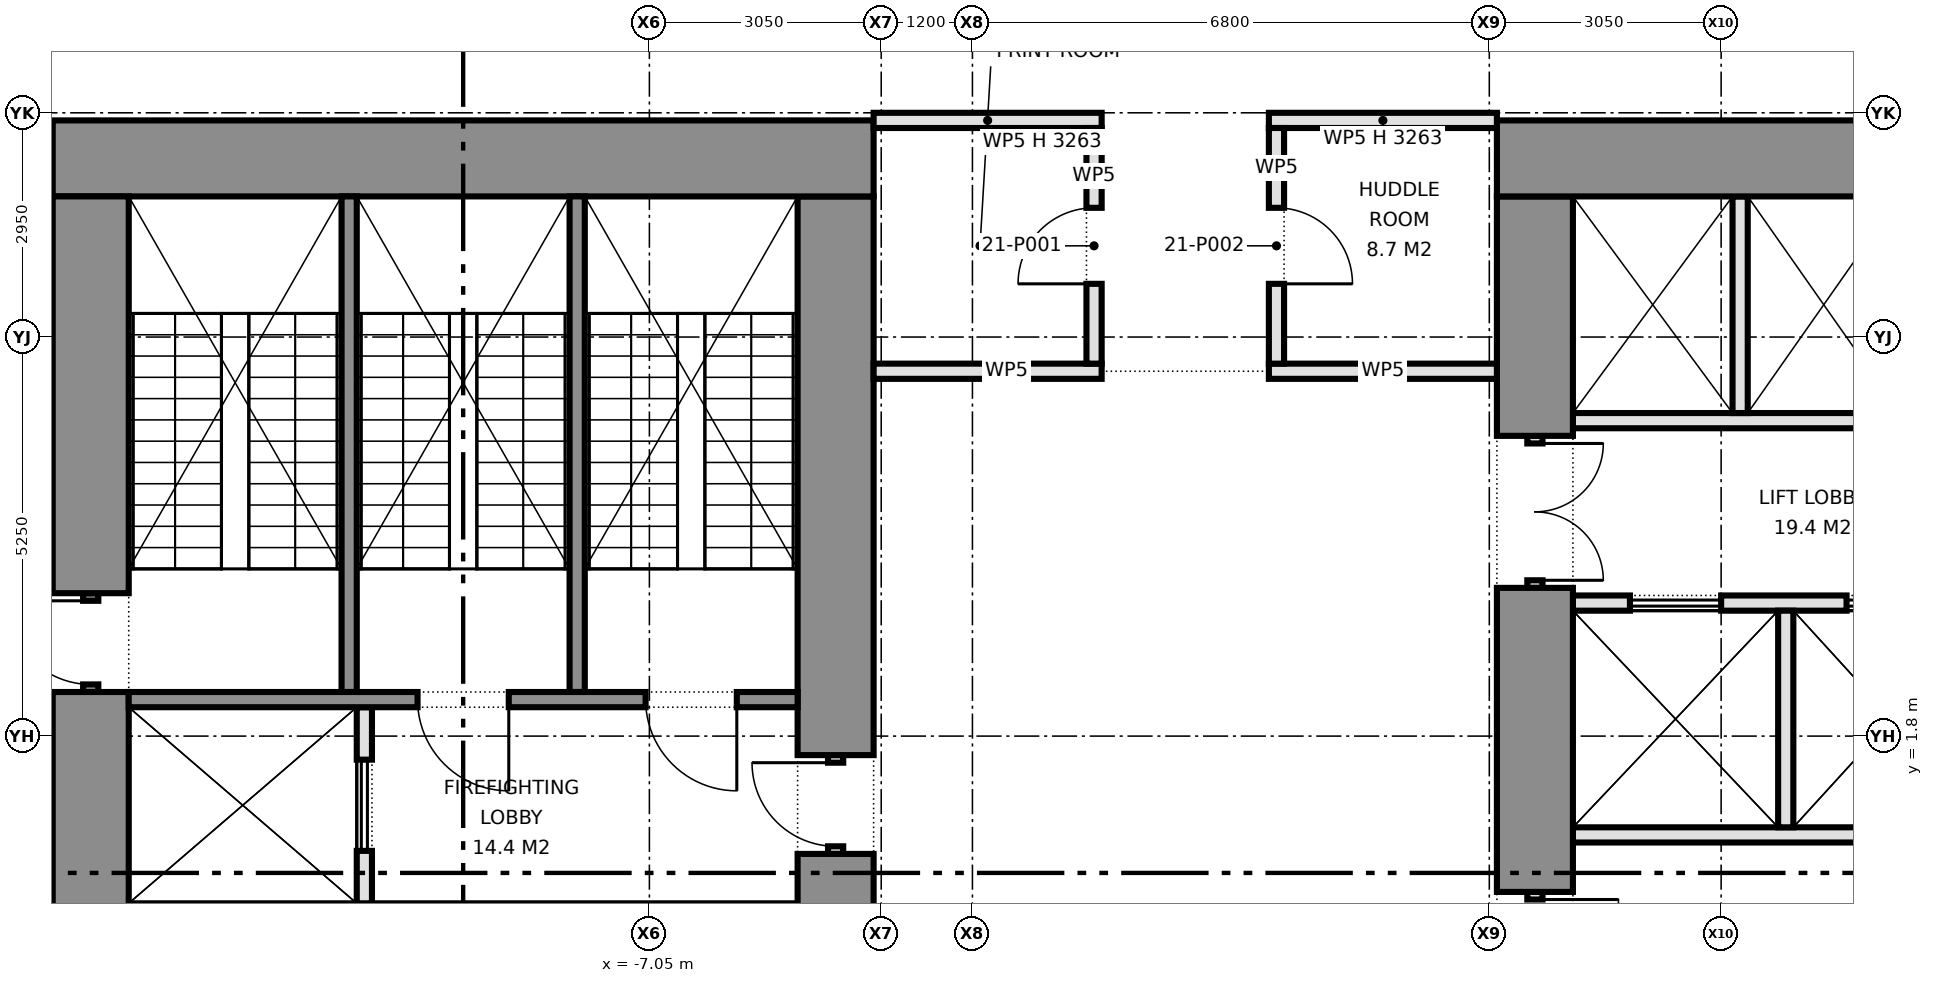
"""IFC4 building model, lengths in metres.
Left out: names, types, materials, properties, quantities, classifications, styles, units other than length and angle.
Written with IfcOpenShell. Run it as: python <this file> out.ifc"""

import sys

from ifc_helpers import new_model, si_unit, direction, frame, frame_2d, origin, place, context, subcontext, project, spatial, rectangle, extrude, element, fill, save


model = new_model("IFC4")
c1 = context("Model", 3, precision=1e-05, world=origin(), true_north=direction((0.0, 1.0)))
c2 = subcontext(c1, "Body", "Model", "MODEL_VIEW")
j1 = project(units=[si_unit("LENGTHUNIT", "METRE"), si_unit("PLANEANGLEUNIT", "RADIAN")], contexts=[c1])
p1 = place(None, origin())
s1 = spatial("IfcSite", under=j1, at=p1, CompositionType="ELEMENT")
p2 = place(p1, origin())
s2 = spatial("IfcBuilding", under=s1, at=p2, CompositionType="ELEMENT")
p3 = place(p2, frame((0.0, 0.0, 95.2)))
s3 = spatial("IfcBuildingStorey", under=s2, at=p3, CompositionType="ELEMENT", Elevation=95.2)
p4 = place(p3, frame((-14.9, 9.4, 0.0), z_axis=(0.0, 0.0, 1.0), x_axis=(1.0, 0.0, 0.0)))
e1 = element("IfcWall", 1, at=p4, inside=s3, PredefinedType="SHEAR", context=c2, shape_type="SweptSolid", body=[
    extrude(rectangle(XDim=10.8, YDim=1.0, at=frame_2d((5.4, 0.0))), origin(), (0.0, 0.0, 1.0), 4.2),
])
p5 = place(p3, frame((-14.4, -3.75, 0.0), z_axis=(0.0, 0.0, 1.0), x_axis=(0.0, 1.0, 0.0)))
e2 = element("IfcWall", 2, at=p5, inside=s3, PredefinedType="SHEAR", context=c2, shape_type="SweptSolid", body=[
    extrude(rectangle(XDim=6.13, YDim=1.0, at=frame_2d((3.065, 0.0))), origin(), (0.0, 0.0, 1.0), 4.2),
])
p6 = place(p3, frame((-14.4, 2.38, 0.0), z_axis=(0.0, 0.0, 1.0), x_axis=(0.0, 1.0, 0.0)))
e3 = element("IfcWall", 3, at=p6, inside=s3, PredefinedType="SHEAR", context=c2, shape_type="SweptSolid", body=[
    extrude(rectangle(XDim=1.3, YDim=0.2, at=frame_2d((0.65, 0.0))), origin(), (0.0, 0.0, 1.0), 2.4),
])
p7 = place(p6, frame((0.1, 0.0, 0.0)))
e4 = element("IfcOpeningElement", 4, at=p7, cuts=e3, PredefinedType="OPENING", context=c2, shape_type="SweptSolid", body=[
    extrude(rectangle(XDim=1.1, YDim=2.1, at=frame_2d((0.55, 1.05))), frame((0.0, 0.11, 0.0), z_axis=(0.0, -1.0, 0.0), x_axis=(1.0, 0.0, 0.0)), (0.0, 0.0, 1.0), 0.22),
])
p8 = place(p3, frame((-14.4, 3.68, 0.0), z_axis=(0.0, 0.0, 1.0), x_axis=(0.0, 1.0, 0.0)))
e5 = element("IfcWall", 5, at=p8, inside=s3, PredefinedType="SHEAR", context=c2, shape_type="SweptSolid", body=[
    extrude(rectangle(XDim=5.22, YDim=1.0, at=frame_2d((2.61, 0.0))), origin(), (0.0, 0.0, 1.0), 4.2),
])
p9 = place(p3, frame((-4.6, -3.75, 0.0), z_axis=(0.0, 0.0, 1.0), x_axis=(0.0, 1.0, 0.0)))
e6 = element("IfcWall", 6, at=p9, inside=s3, PredefinedType="SHEAR", context=c2, shape_type="SweptSolid", body=[
    extrude(rectangle(XDim=4.0, YDim=1.0, at=frame_2d((2.0, 0.0))), origin(), (0.0, 0.0, 1.0), 4.2),
])
p10 = place(p3, frame((-4.6, 0.25, 0.0), z_axis=(0.0, 0.0, 1.0), x_axis=(0.0, 1.0, 0.0)))
e7 = element("IfcWall", 7, at=p10, inside=s3, PredefinedType="PARTITIONING", context=c2, shape_type="SweptSolid", body=[
    extrude(rectangle(XDim=1.3, YDim=0.2, at=frame_2d((0.65, 0.0))), origin(), (0.0, 0.0, 1.0), 2.4),
])
p11 = place(p10, frame((0.1, 0.0, 0.0)))
e8 = element("IfcOpeningElement", 8, at=p11, cuts=e7, PredefinedType="OPENING", context=c2, shape_type="SweptSolid", body=[
    extrude(rectangle(XDim=1.1, YDim=2.1, at=frame_2d((0.55, 1.05))), frame((0.0, 0.11, 0.0), z_axis=(0.0, -1.0, 0.0), x_axis=(1.0, 0.0, 0.0)), (0.0, 0.0, 1.0), 0.22),
])
p12 = place(p3, frame((-4.6, 1.55, 0.0), z_axis=(0.0, 0.0, 1.0), x_axis=(0.0, 1.0, 0.0)))
e9 = element("IfcWall", 9, at=p12, inside=s3, PredefinedType="SHEAR", context=c2, shape_type="SweptSolid", body=[
    extrude(rectangle(XDim=7.35, YDim=1.0, at=frame_2d((3.675, 0.0))), origin(), (0.0, 0.0, 1.0), 4.2),
])
p13 = place(p3, frame((-10.8, -0.4, 0.0), z_axis=(0.0, 0.0, 1.0), x_axis=(0.0, 1.0, 0.0)))
e10 = element("IfcWall", 10, at=p13, inside=s3, PredefinedType="PARTITIONING", context=c2, shape_type="SweptSolid", body=[
    extrude(rectangle(XDim=2.58, YDim=0.2, at=frame_2d((1.29, 0.0))), origin(), (0.0, 0.0, 1.0), 4.2),
])
p14 = place(p13, frame((0.69, 0.0, 0.0)))
e11 = element("IfcOpeningElement", 11, at=p14, cuts=e10, PredefinedType="OPENING", context=c2, shape_type="SweptSolid", body=[
    extrude(rectangle(XDim=1.2, YDim=2.1, at=frame_2d((0.6, 1.05))), frame((0.0, 0.11, 0.0), z_axis=(0.0, -1.0, 0.0), x_axis=(1.0, 0.0, 0.0)), (0.0, 0.0, 1.0), 0.22),
])
p15 = place(p3, frame((-13.9, 2.28, 0.0), z_axis=(0.0, 0.0, 1.0), x_axis=(1.0, 0.0, 0.0)))
e12 = element("IfcWall", 12, at=p15, inside=s3, PredefinedType="SHEAR", context=c2, shape_type="SweptSolid", body=[
    extrude(rectangle(XDim=8.8, YDim=0.2, at=frame_2d((4.4, 0.0))), origin(), (0.0, 0.0, 1.0), 4.2),
])
p16 = place(p15, frame((3.8, 0.0, 0.0)))
e13 = element("IfcOpeningElement", 13, at=p16, cuts=e12, PredefinedType="OPENING", context=c2, shape_type="SweptSolid", body=[
    extrude(rectangle(XDim=1.2, YDim=2.1, at=frame_2d((0.6, 1.05))), frame((0.0, 0.11, 0.0), z_axis=(0.0, -1.0, 0.0), x_axis=(1.0, 0.0, 0.0)), (0.0, 0.0, 1.0), 0.22),
])
p17 = place(p15, frame((6.8, 0.0, 0.0)))
e14 = element("IfcOpeningElement", 14, at=p17, cuts=e12, PredefinedType="OPENING", context=c2, shape_type="SweptSolid", body=[
    extrude(rectangle(XDim=1.2, YDim=2.1, at=frame_2d((0.6, 1.05))), frame((0.0, 0.11, 0.0), z_axis=(0.0, -1.0, 0.0), x_axis=(1.0, 0.0, 0.0)), (0.0, 0.0, 1.0), 0.22),
])
for number, where, z_axis, x_axis in (
    (15, (-11.0, 2.38, 0.0), (0.0, 0.0, 1.0), (0.0, 1.0, 0.0)),
    (16, (-8.0, 2.38, 0.0), (0.0, 0.0, 1.0), (0.0, 1.0, 0.0)),
):
    element("IfcWall", number, at=place(p3, frame(where, z_axis=z_axis, x_axis=x_axis)), inside=s3, PredefinedType="SHEAR", context=c2, shape_type="SweptSolid", body=[
        extrude(rectangle(XDim=6.52, YDim=0.2, at=frame_2d((3.26, 0.0))), origin(), (0.0, 0.0, 1.0), 4.2),
    ])
p18 = place(p3, frame((14.9, 9.4, 0.0), z_axis=(0.0, 0.0, 1.0), x_axis=(-1.0, 0.0, 0.0)))
e17 = element("IfcWall", 17, at=p18, inside=s3, PredefinedType="SHEAR", context=c2, shape_type="SweptSolid", body=[
    extrude(rectangle(XDim=10.8, YDim=1.0, at=frame_2d((5.4, 0.0))), origin(), (0.0, 0.0, 1.0), 4.2),
])
p19 = place(p3, frame((4.6, 8.9, 0.0), z_axis=(0.0, 0.0, 1.0), x_axis=(0.0, -1.0, 0.0)))
e18 = element("IfcWall", 18, at=p19, inside=s3, PredefinedType="SHEAR", context=c2, shape_type="SweptSolid", body=[
    extrude(rectangle(XDim=3.15, YDim=1.0, at=frame_2d((1.575, 0.0))), origin(), (0.0, 0.0, 1.0), 4.2),
])
p20 = place(p3, frame((4.6, 5.75, 0.0), z_axis=(0.0, 0.0, 1.0), x_axis=(0.0, -1.0, 0.0)))
e19 = element("IfcWall", 19, at=p20, inside=s3, PredefinedType="PARTITIONING", context=c2, shape_type="SweptSolid", body=[
    extrude(rectangle(XDim=2.0, YDim=0.2, at=frame_2d((1.0, 0.0))), origin(), (0.0, 0.0, 1.0), 2.4),
])
p21 = place(p20, frame((0.1, 0.0, 0.0)))
e20 = element("IfcOpeningElement", 20, at=p21, cuts=e19, PredefinedType="OPENING", context=c2, shape_type="SweptSolid", body=[
    extrude(rectangle(XDim=1.8, YDim=2.1, at=frame_2d((0.9, 1.05))), frame((0.0, 0.11, 0.0), z_axis=(0.0, -1.0, 0.0), x_axis=(1.0, 0.0, 0.0)), (0.0, 0.0, 1.0), 0.22),
])
p22 = place(p3, frame((4.6, 3.75, 0.0), z_axis=(0.0, 0.0, 1.0), x_axis=(0.0, -1.0, 0.0)))
e21 = element("IfcWall", 21, at=p22, inside=s3, PredefinedType="SHEAR", context=c2, shape_type="SweptSolid", body=[
    extrude(rectangle(XDim=4.0, YDim=1.0, at=frame_2d((2.0, 0.0))), origin(), (0.0, 0.0, 1.0), 4.2),
])
p23 = place(p3, frame((4.6, -0.25, 0.0), z_axis=(0.0, 0.0, 1.0), x_axis=(0.0, -1.0, 0.0)))
e22 = element("IfcWall", 22, at=p23, inside=s3, PredefinedType="PARTITIONING", context=c2, shape_type="SweptSolid", body=[
    extrude(rectangle(XDim=1.3, YDim=0.2, at=frame_2d((0.65, 0.0))), origin(), (0.0, 0.0, 1.0), 2.4),
])
p24 = place(p23, frame((0.1, 0.0, 0.0)))
e23 = element("IfcOpeningElement", 23, at=p24, cuts=e22, PredefinedType="OPENING", context=c2, shape_type="SweptSolid", body=[
    extrude(rectangle(XDim=1.1, YDim=2.1, at=frame_2d((0.55, 1.05))), frame((0.0, 0.11, 0.0), z_axis=(0.0, -1.0, 0.0), x_axis=(1.0, 0.0, 0.0)), (0.0, 0.0, 1.0), 0.22),
])
p25 = place(p3, frame((13.9, 5.95, 0.0), z_axis=(0.0, 0.0, 1.0), x_axis=(-1.0, 0.0, 0.0)))
e24 = element("IfcWall", 24, at=p25, inside=s3, PredefinedType="PARTITIONING", context=c2, shape_type="SweptSolid", body=[
    extrude(rectangle(XDim=8.8, YDim=0.2, at=frame_2d((4.4, 0.0))), origin(), (0.0, 0.0, 1.0), 4.2),
])
p26 = place(p25, frame((1.7, 0.0, 0.0)))
e25 = element("IfcOpeningElement", 25, at=p26, cuts=e24, PredefinedType="OPENING", context=c2, shape_type="SweptSolid", body=[
    extrude(rectangle(XDim=0.9, YDim=2.1, at=frame_2d((0.45, 1.05))), frame((0.0, 0.11, 0.0), z_axis=(0.0, -1.0, 0.0), x_axis=(1.0, 0.0, 0.0)), (0.0, 0.0, 1.0), 0.22),
])
p27 = place(p3, frame((13.9, 3.55, 0.0), z_axis=(0.0, 0.0, 1.0), x_axis=(-1.0, 0.0, 0.0)))
e26 = element("IfcWall", 26, at=p27, inside=s3, PredefinedType="PARTITIONING", context=c2, shape_type="SweptSolid", body=[
    extrude(rectangle(XDim=8.8, YDim=0.2, at=frame_2d((4.4, 0.0))), origin(), (0.0, 0.0, 1.0), 4.2),
])
p28 = place(p27, frame((0.65, 0.0, 0.0)))
e27 = element("IfcOpeningElement", 27, at=p28, cuts=e26, PredefinedType="OPENING", context=c2, shape_type="SweptSolid", body=[
    extrude(rectangle(XDim=1.8, YDim=2.1, at=frame_2d((0.9, 1.05))), frame((0.0, 0.11, 0.0), z_axis=(0.0, -1.0, 0.0), x_axis=(1.0, 0.0, 0.0)), (0.0, 0.0, 1.0), 0.22),
])
p29 = place(p27, frame((4.0, 0.0, 0.0)))
e28 = element("IfcOpeningElement", 28, at=p29, cuts=e26, PredefinedType="OPENING", context=c2, shape_type="SweptSolid", body=[
    extrude(rectangle(XDim=1.2, YDim=2.1, at=frame_2d((0.6, 1.05))), frame((0.0, 0.11, 0.0), z_axis=(0.0, -1.0, 0.0), x_axis=(1.0, 0.0, 0.0)), (0.0, 0.0, 1.0), 0.22),
])
p30 = place(p27, frame((6.85, 0.0, 0.0)))
e29 = element("IfcOpeningElement", 29, at=p30, cuts=e26, PredefinedType="OPENING", context=c2, shape_type="SweptSolid", body=[
    extrude(rectangle(XDim=1.2, YDim=2.1, at=frame_2d((0.6, 1.05))), frame((0.0, 0.11, 0.0), z_axis=(0.0, -1.0, 0.0), x_axis=(1.0, 0.0, 0.0)), (0.0, 0.0, 1.0), 0.22),
])
p31 = place(p3, frame((13.9, 0.5, 0.0), z_axis=(0.0, 0.0, 1.0), x_axis=(-1.0, 0.0, 0.0)))
e30 = element("IfcWall", 30, at=p31, inside=s3, PredefinedType="PARTITIONING", context=c2, shape_type="SweptSolid", body=[
    extrude(rectangle(XDim=8.8, YDim=0.2, at=frame_2d((4.4, 0.0))), origin(), (0.0, 0.0, 1.0), 4.2),
])
for number, where, z_axis, x_axis in (
    (31, (7.3, 8.9, 0.0), (0.0, 0.0, 1.0), (0.0, -1.0, 0.0)),
    (32, (7.9, 3.45, 0.0), (0.0, 0.0, 1.0), (0.0, -1.0, 0.0)),
):
    element("IfcWall", number, at=place(p3, frame(where, z_axis=z_axis, x_axis=x_axis)), inside=s3, PredefinedType="PARTITIONING", context=c2, shape_type="SweptSolid", body=[
        extrude(rectangle(XDim=2.85, YDim=0.2, at=frame_2d((1.425, 0.0))), origin(), (0.0, 0.0, 1.0), 4.2),
    ])
for number, where, z_axis, x_axis in (
    (33, (-4.1, 6.6, 0.0), (0.0, 0.0, 1.0), (1.0, 0.0, 0.0)),
    (34, (1.1, 6.6, 0.0), (0.0, 0.0, 1.0), (1.0, 0.0, 0.0)),
):
    element("IfcWall", number, at=place(p3, frame(where, z_axis=z_axis, x_axis=x_axis)), inside=s3, PredefinedType="PARTITIONING", context=c2, shape_type="SweptSolid", body=[
        extrude(rectangle(XDim=3.0, YDim=0.2, at=frame_2d((1.5, 0.0))), origin(), (0.0, 0.0, 1.0), 4.2),
    ])
for number, where, z_axis, x_axis in (
    (35, (-4.1, 9.9, 0.0), (0.0, 0.0, 1.0), (1.0, 0.0, 0.0)),
    (36, (1.1, 9.9, 0.0), (0.0, 0.0, 1.0), (1.0, 0.0, 0.0)),
):
    element("IfcWall", number, at=place(p3, frame(where, z_axis=z_axis, x_axis=x_axis)), inside=s3, PredefinedType="PARTITIONING", context=c2, shape_type="SweptSolid", body=[
        extrude(rectangle(XDim=3.0, YDim=0.2, at=frame_2d((1.5, 0.0))), origin(), (0.0, 0.0, 1.0), 3.263),
    ])
p32 = place(p3, frame((1.2, 6.7, 0.0), z_axis=(0.0, 0.0, 1.0), x_axis=(0.0, 1.0, 0.0)))
e37 = element("IfcWall", 37, at=p32, inside=s3, PredefinedType="PARTITIONING", context=c2, shape_type="SweptSolid", body=[
    extrude(rectangle(XDim=3.1, YDim=0.2, at=frame_2d((1.55, 0.0))), origin(), (0.0, 0.0, 1.0), 4.2),
])
p33 = place(p32, frame((1.05, 0.0, 0.0)))
e38 = element("IfcOpeningElement", 38, at=p33, cuts=e37, PredefinedType="OPENING", context=c2, shape_type="SweptSolid", body=[
    extrude(rectangle(XDim=1.0, YDim=2.1, at=frame_2d((0.5, 1.05))), frame((0.0, 0.11, 0.0), z_axis=(0.0, -1.0, 0.0), x_axis=(1.0, 0.0, 0.0)), (0.0, 0.0, 1.0), 0.22),
])
p34 = place(p3, frame((-1.2, 6.7, 0.0), z_axis=(0.0, 0.0, 1.0), x_axis=(0.0, 1.0, 0.0)))
e39 = element("IfcWall", 39, at=p34, inside=s3, PredefinedType="PARTITIONING", context=c2, shape_type="SweptSolid", body=[
    extrude(rectangle(XDim=3.1, YDim=0.2, at=frame_2d((1.55, 0.0))), origin(), (0.0, 0.0, 1.0), 4.2),
])
p35 = place(p34, frame((1.05, 0.0, 0.0)))
e40 = element("IfcOpeningElement", 40, at=p35, cuts=e39, PredefinedType="OPENING", context=c2, shape_type="SweptSolid", body=[
    extrude(rectangle(XDim=1.0, YDim=2.1, at=frame_2d((0.5, 1.05))), frame((0.0, 0.11, 0.0), z_axis=(0.0, -1.0, 0.0), x_axis=(1.0, 0.0, 0.0)), (0.0, 0.0, 1.0), 0.22),
])
p36 = place(p7, origin())
e41 = element("IfcDoor", 41, at=p36, inside=s3, OperationType="SINGLE_SWING_RIGHT", PredefinedType="DOOR", context=c2, shape_type="SweptSolid", body=[
    extrude(rectangle(XDim=1.1, YDim=2.1, at=frame_2d((0.55, 1.05))), frame((0.0, 0.025, 0.0), z_axis=(0.0, -1.0, 0.0), x_axis=(1.0, 0.0, 0.0)), (0.0, 0.0, 1.0), 0.05),
])
fill(e4, e41)
p37 = place(p11, origin())
e42 = element("IfcDoor", 42, at=p37, inside=s3, OperationType="SINGLE_SWING_RIGHT", PredefinedType="DOOR", context=c2, shape_type="SweptSolid", body=[
    extrude(rectangle(XDim=1.1, YDim=2.1, at=frame_2d((0.55, 1.05))), frame((0.0, 0.025, 0.0), z_axis=(0.0, -1.0, 0.0), x_axis=(1.0, 0.0, 0.0)), (0.0, 0.0, 1.0), 0.05),
])
fill(e8, e42)
p38 = place(p14, origin())
e43 = element("IfcDoor", 43, at=p38, inside=s3, OperationType="DOUBLE_DOOR_SLIDING", PredefinedType="DOOR", context=c2, shape_type="SweptSolid", body=[
    extrude(rectangle(XDim=1.2, YDim=2.1, at=frame_2d((0.6, 1.05))), frame((0.0, 0.025, 0.0), z_axis=(0.0, -1.0, 0.0), x_axis=(1.0, 0.0, 0.0)), (0.0, 0.0, 1.0), 0.05),
])
fill(e11, e43)
p39 = place(p16, frame((1.2, 0.0, 0.0), z_axis=(0.0, 0.0, 1.0), x_axis=(-1.0, 0.0, 0.0)))
e44 = element("IfcDoor", 44, at=p39, inside=s3, OperationType="SINGLE_SWING_LEFT", PredefinedType="DOOR", context=c2, shape_type="SweptSolid", body=[
    extrude(rectangle(XDim=1.2, YDim=2.1, at=frame_2d((0.6, 1.05))), frame((0.0, 0.025, 0.0), z_axis=(0.0, -1.0, 0.0), x_axis=(1.0, 0.0, 0.0)), (0.0, 0.0, 1.0), 0.05),
])
fill(e13, e44)
p40 = place(p17, frame((1.2, 0.0, 0.0), z_axis=(0.0, 0.0, 1.0), x_axis=(-1.0, 0.0, 0.0)))
e45 = element("IfcDoor", 45, at=p40, inside=s3, OperationType="SINGLE_SWING_LEFT", PredefinedType="DOOR", context=c2, shape_type="SweptSolid", body=[
    extrude(rectangle(XDim=1.2, YDim=2.1, at=frame_2d((0.6, 1.05))), frame((0.0, 0.025, 0.0), z_axis=(0.0, -1.0, 0.0), x_axis=(1.0, 0.0, 0.0)), (0.0, 0.0, 1.0), 0.05),
])
fill(e14, e45)
p41 = place(p21, origin())
e46 = element("IfcDoor", 46, at=p41, inside=s3, OperationType="DOUBLE_DOOR_SINGLE_SWING", PredefinedType="DOOR", context=c2, shape_type="SweptSolid", body=[
    extrude(rectangle(XDim=1.8, YDim=2.1, at=frame_2d((0.9, 1.05))), frame((0.0, 0.025, 0.0), z_axis=(0.0, -1.0, 0.0), x_axis=(1.0, 0.0, 0.0)), (0.0, 0.0, 1.0), 0.05),
])
fill(e20, e46)
p42 = place(p24, origin())
e47 = element("IfcDoor", 47, at=p42, inside=s3, OperationType="SINGLE_SWING_LEFT", PredefinedType="DOOR", context=c2, shape_type="SweptSolid", body=[
    extrude(rectangle(XDim=1.1, YDim=2.1, at=frame_2d((0.55, 1.05))), frame((0.0, 0.025, 0.0), z_axis=(0.0, -1.0, 0.0), x_axis=(1.0, 0.0, 0.0)), (0.0, 0.0, 1.0), 0.05),
])
fill(e23, e47)
p43 = place(p29, origin())
e48 = element("IfcDoor", 48, at=p43, inside=s3, OperationType="DOUBLE_DOOR_SLIDING", PredefinedType="DOOR", context=c2, shape_type="SweptSolid", body=[
    extrude(rectangle(XDim=1.2, YDim=2.1, at=frame_2d((0.6, 1.05))), frame((0.0, 0.025, 0.0), z_axis=(0.0, -1.0, 0.0), x_axis=(1.0, 0.0, 0.0)), (0.0, 0.0, 1.0), 0.05),
])
fill(e28, e48)
p44 = place(p30, origin())
e49 = element("IfcDoor", 49, at=p44, inside=s3, OperationType="DOUBLE_DOOR_SLIDING", PredefinedType="DOOR", context=c2, shape_type="SweptSolid", body=[
    extrude(rectangle(XDim=1.2, YDim=2.1, at=frame_2d((0.6, 1.05))), frame((0.0, 0.025, 0.0), z_axis=(0.0, -1.0, 0.0), x_axis=(1.0, 0.0, 0.0)), (0.0, 0.0, 1.0), 0.05),
])
fill(e29, e49)
p45 = place(p35, origin())
e50 = element("IfcDoor", 50, at=p45, inside=s3, OperationType="SINGLE_SWING_LEFT", PredefinedType="DOOR", context=c2, shape_type="SweptSolid", body=[
    extrude(rectangle(XDim=1.0, YDim=2.1, at=frame_2d((0.5, 1.05))), frame((0.0, 0.025, 0.0), z_axis=(0.0, -1.0, 0.0), x_axis=(1.0, 0.0, 0.0)), (0.0, 0.0, 1.0), 0.05),
])
fill(e40, e50)
p46 = place(p33, frame((1.0, 0.0, 0.0), z_axis=(0.0, 0.0, 1.0), x_axis=(-1.0, 0.0, 0.0)))
e51 = element("IfcDoor", 51, at=p46, inside=s3, OperationType="SINGLE_SWING_RIGHT", PredefinedType="DOOR", context=c2, shape_type="SweptSolid", body=[
    extrude(rectangle(XDim=1.0, YDim=2.1, at=frame_2d((0.5, 1.05))), frame((0.0, 0.025, 0.0), z_axis=(0.0, -1.0, 0.0), x_axis=(1.0, 0.0, 0.0)), (0.0, 0.0, 1.0), 0.05),
])
fill(e38, e51)
save(model, sys.argv[1])
